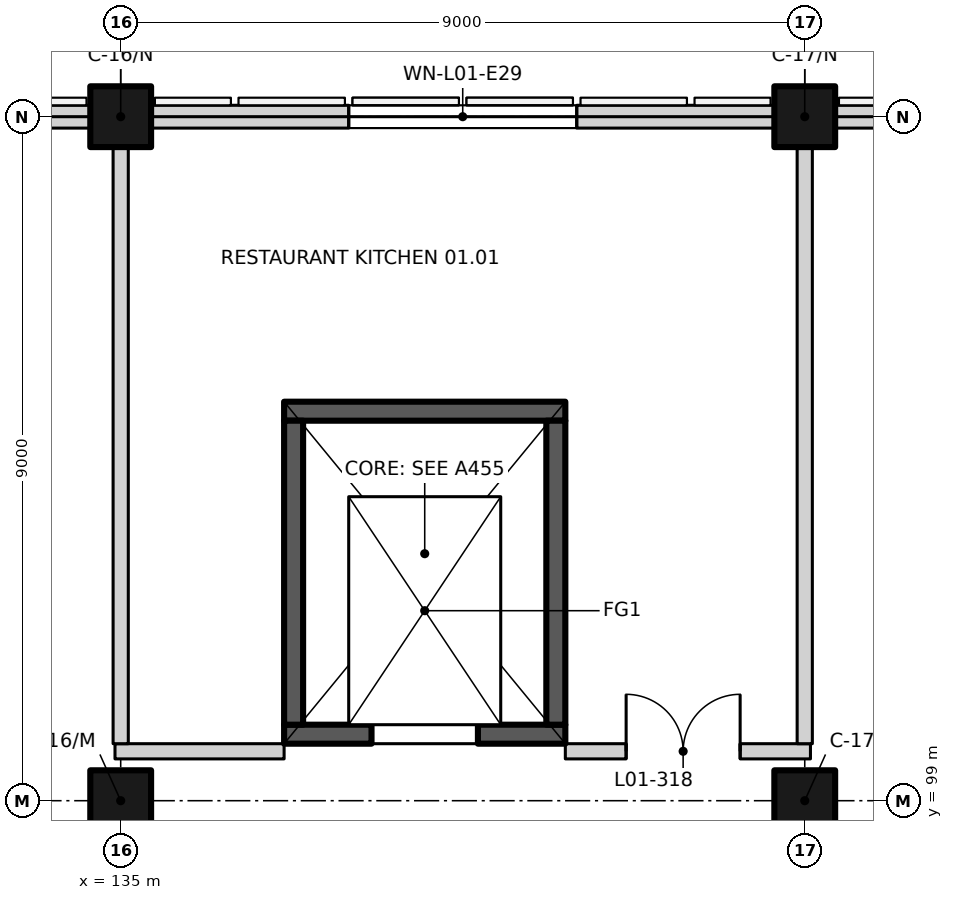
"""IFC4 building model, lengths in metres.
Left out: names, types, materials, properties, quantities, classifications, styles, units other than length and angle.
Written with IfcOpenShell. Run it as: python <this file> out.ifc"""

import sys

from ifc_helpers import new_model, si_unit, direction, frame, frame_2d, origin, origin_2d, place, context, subcontext, project, spatial, rectangle, extrude, element, fill, save


model = new_model("IFC4")
c1 = context("Model", 3, precision=1e-05, world=origin(), true_north=direction((0.0, 1.0)))
c2 = subcontext(c1, "Body", "Model", "MODEL_VIEW")
j1 = project(units=[si_unit("LENGTHUNIT", "METRE"), si_unit("PLANEANGLEUNIT", "RADIAN")], contexts=[c1])
p1 = place(None, origin())
s1 = spatial("IfcSite", under=j1, at=p1, CompositionType="ELEMENT")
p2 = place(p1, origin())
s2 = spatial("IfcBuilding", under=s1, at=p2, CompositionType="ELEMENT")
p3 = place(p2, frame((0.0, 0.0, 6.0)))
s3 = spatial("IfcBuildingStorey", under=s2, at=p3, CompositionType="ELEMENT", Elevation=6.0)
for number, where, z_axis, x_axis in (
    (1, (135.0, 99.0, 0.0), (0.0, 0.0, 1.0), (1.0, 0.0, 0.0)),
    (2, (144.0, 99.0, 0.0), (0.0, 0.0, 1.0), (1.0, 0.0, 0.0)),
    (3, (135.0, 108.0, 0.0), (0.0, 0.0, 1.0), (1.0, 0.0, 0.0)),
    (4, (144.0, 108.0, 0.0), (0.0, 0.0, 1.0), (1.0, 0.0, 0.0)),
):
    element("IfcColumn", number, at=place(p3, frame(where, z_axis=z_axis, x_axis=x_axis)), inside=s3, PredefinedType="COLUMN", context=c2, shape_type="SweptSolid", body=[
        extrude(rectangle(XDim=0.8, YDim=0.8, at=origin_2d()), origin(), (0.0, 0.0, 1.0), 4.5),
    ])
p4 = place(p3, frame((137.15, 99.875, 0.0), z_axis=(0.0, 0.0, 1.0), x_axis=(1.0, 0.0, 0.0)))
e5 = element("IfcWall", 5, at=p4, inside=s3, PredefinedType="SHEAR", context=c2, shape_type="SweptSolid", body=[
    extrude(rectangle(XDim=3.7, YDim=0.25, at=frame_2d((1.85, 0.0))), origin(), (0.0, 0.0, 1.0), 4.5),
])
p5 = place(p4, frame((1.15, 0.0, 0.0)))
e6 = element("IfcOpeningElement", 6, at=p5, cuts=e5, PredefinedType="OPENING", context=c2, shape_type="SweptSolid", body=[
    extrude(rectangle(XDim=1.4, YDim=2.1, at=frame_2d((0.7, 1.05))), frame((0.0, 0.135, 0.0), z_axis=(0.0, -1.0, 0.0), x_axis=(1.0, 0.0, 0.0)), (0.0, 0.0, 1.0), 0.27),
])
p6 = place(p3, frame((137.15, 104.125, 0.0), z_axis=(0.0, 0.0, 1.0), x_axis=(1.0, 0.0, 0.0)))
e7 = element("IfcWall", 7, at=p6, inside=s3, PredefinedType="SHEAR", context=c2, shape_type="SweptSolid", body=[
    extrude(rectangle(XDim=3.7, YDim=0.25, at=frame_2d((1.85, 0.0))), origin(), (0.0, 0.0, 1.0), 4.5),
])
for number, where, z_axis, x_axis in (
    (8, (137.275, 100.0, 0.0), (0.0, 0.0, 1.0), (0.0, 1.0, 0.0)),
    (9, (140.725, 100.0, 0.0), (0.0, 0.0, 1.0), (0.0, 1.0, 0.0)),
):
    element("IfcWall", number, at=place(p3, frame(where, z_axis=z_axis, x_axis=x_axis)), inside=s3, PredefinedType="SHEAR", context=c2, shape_type="SweptSolid", body=[
        extrude(rectangle(XDim=4.0, YDim=0.25, at=frame_2d((2.0, 0.0))), origin(), (0.0, 0.0, 1.0), 4.5),
    ])
p7 = place(p3, frame((126.4, 108.0, 0.0), z_axis=(0.0, 0.0, 1.0), x_axis=(1.0, 0.0, 0.0)))
e10 = element("IfcWall", 10, at=p7, inside=s3, PredefinedType="SOLIDWALL", context=c2, shape_type="SweptSolid", body=[
    extrude(rectangle(XDim=8.2, YDim=0.3, at=frame_2d((4.1, 0.0))), origin(), (0.0, 0.0, 1.0), 3.65),
])
p8 = place(p7, frame((2.6, 0.0, 0.9)))
e11 = element("IfcOpeningElement", 11, at=p8, cuts=e10, PredefinedType="OPENING", context=c2, shape_type="SweptSolid", body=[
    extrude(rectangle(XDim=3.0, YDim=2.1, at=frame_2d((1.5, 1.05))), frame((0.0, 0.16, 0.0), z_axis=(0.0, -1.0, 0.0), x_axis=(1.0, 0.0, 0.0)), (0.0, 0.0, 1.0), 0.32),
])
p9 = place(p3, frame((135.4, 108.0, 0.0), z_axis=(0.0, 0.0, 1.0), x_axis=(1.0, 0.0, 0.0)))
e12 = element("IfcWall", 12, at=p9, inside=s3, PredefinedType="SOLIDWALL", context=c2, shape_type="SweptSolid", body=[
    extrude(rectangle(XDim=8.2, YDim=0.3, at=frame_2d((4.1, 0.0))), origin(), (0.0, 0.0, 1.0), 3.65),
])
p10 = place(p9, frame((2.6, 0.0, 0.9)))
e13 = element("IfcOpeningElement", 13, at=p10, cuts=e12, PredefinedType="OPENING", context=c2, shape_type="SweptSolid", body=[
    extrude(rectangle(XDim=3.0, YDim=2.1, at=frame_2d((1.5, 1.05))), frame((0.0, 0.16, 0.0), z_axis=(0.0, -1.0, 0.0), x_axis=(1.0, 0.0, 0.0)), (0.0, 0.0, 1.0), 0.32),
])
p11 = place(p3, frame((144.4, 108.0, 0.0), z_axis=(0.0, 0.0, 1.0), x_axis=(1.0, 0.0, 0.0)))
e14 = element("IfcWall", 14, at=p11, inside=s3, PredefinedType="SOLIDWALL", context=c2, shape_type="SweptSolid", body=[
    extrude(rectangle(XDim=8.2, YDim=0.3, at=frame_2d((4.1, 0.0))), origin(), (0.0, 0.0, 1.0), 3.65),
])
p12 = place(p11, frame((2.6, 0.0, 0.9)))
e15 = element("IfcOpeningElement", 15, at=p12, cuts=e14, PredefinedType="OPENING", context=c2, shape_type="SweptSolid", body=[
    extrude(rectangle(XDim=3.0, YDim=2.1, at=frame_2d((1.5, 1.05))), frame((0.0, 0.16, 0.0), z_axis=(0.0, -1.0, 0.0), x_axis=(1.0, 0.0, 0.0)), (0.0, 0.0, 1.0), 0.32),
])
p13 = place(p3, frame((134.925, 99.65, 0.0), z_axis=(0.0, 0.0, 1.0), x_axis=(1.0, 0.0, 0.0)))
e16 = element("IfcWall", 16, at=p13, inside=s3, PredefinedType="PARTITIONING", context=c2, shape_type="SweptSolid", body=[
    extrude(rectangle(XDim=2.225, YDim=0.2, at=frame_2d((1.112, 0.0))), origin(), (0.0, 0.0, 1.0), 4.15),
])
p14 = place(p3, frame((140.85, 99.65, 0.0), z_axis=(0.0, 0.0, 1.0), x_axis=(1.0, 0.0, 0.0)))
e17 = element("IfcWall", 17, at=p14, inside=s3, PredefinedType="PARTITIONING", context=c2, shape_type="SweptSolid", body=[
    extrude(rectangle(XDim=3.225, YDim=0.2, at=frame_2d((1.612, 0.0))), origin(), (0.0, 0.0, 1.0), 4.15),
])
p15 = place(p14, frame((0.8, 0.0, 0.0)))
e18 = element("IfcOpeningElement", 18, at=p15, cuts=e17, PredefinedType="OPENING", context=c2, shape_type="SweptSolid", body=[
    extrude(rectangle(XDim=1.5, YDim=2.4, at=frame_2d((0.75, 1.2))), frame((0.0, 0.11, 0.0), z_axis=(0.0, -1.0, 0.0), x_axis=(1.0, 0.0, 0.0)), (0.0, 0.0, 1.0), 0.22),
])
for number, where, z_axis, x_axis in (
    (19, (135.0, 99.75, 0.0), (0.0, 0.0, 1.0), (0.0, 1.0, 0.0)),
    (20, (144.0, 99.75, 0.0), (0.0, 0.0, 1.0), (0.0, 1.0, 0.0)),
):
    element("IfcWall", number, at=place(p3, frame(where, z_axis=z_axis, x_axis=x_axis)), inside=s3, PredefinedType="PARTITIONING", context=c2, shape_type="SweptSolid", body=[
        extrude(rectangle(XDim=7.85, YDim=0.2, at=frame_2d((3.925, 0.0))), origin(), (0.0, 0.0, 1.0), 4.15),
    ])
p16 = place(p5, origin())
e21 = element("IfcDoor", 21, at=p16, inside=s3, OperationType="DOUBLE_DOOR_SLIDING", PredefinedType="DOOR", context=c2, shape_type="SweptSolid", body=[
    extrude(rectangle(XDim=1.4, YDim=2.1, at=frame_2d((0.7, 1.05))), frame((0.0, 0.025, 0.0), z_axis=(0.0, -1.0, 0.0), x_axis=(1.0, 0.0, 0.0)), (0.0, 0.0, 1.0), 0.05),
])
fill(e6, e21)
p17 = place(p10, origin())
e22 = element("IfcWindow", 22, at=p17, inside=s3, PartitioningType="SINGLE_PANEL", PredefinedType="WINDOW", context=c2, shape_type="SweptSolid", body=[
    extrude(rectangle(XDim=3.0, YDim=2.1, at=frame_2d((1.5, 1.05))), frame((0.0, -0.03, 0.0), z_axis=(0.0, -1.0, 0.0), x_axis=(1.0, 0.0, 0.0)), (0.0, 0.0, 1.0), 0.06),
])
fill(e13, e22)
p18 = place(p15, origin())
e23 = element("IfcDoor", 23, at=p18, inside=s3, OperationType="DOUBLE_DOOR_SINGLE_SWING", PredefinedType="DOOR", context=c2, shape_type="SweptSolid", body=[
    extrude(rectangle(XDim=1.5, YDim=2.4, at=frame_2d((0.75, 1.2))), frame((0.0, 0.025, 0.0), z_axis=(0.0, -1.0, 0.0), x_axis=(1.0, 0.0, 0.0)), (0.0, 0.0, 1.0), 0.05),
])
fill(e18, e23)
save(model, sys.argv[1])
